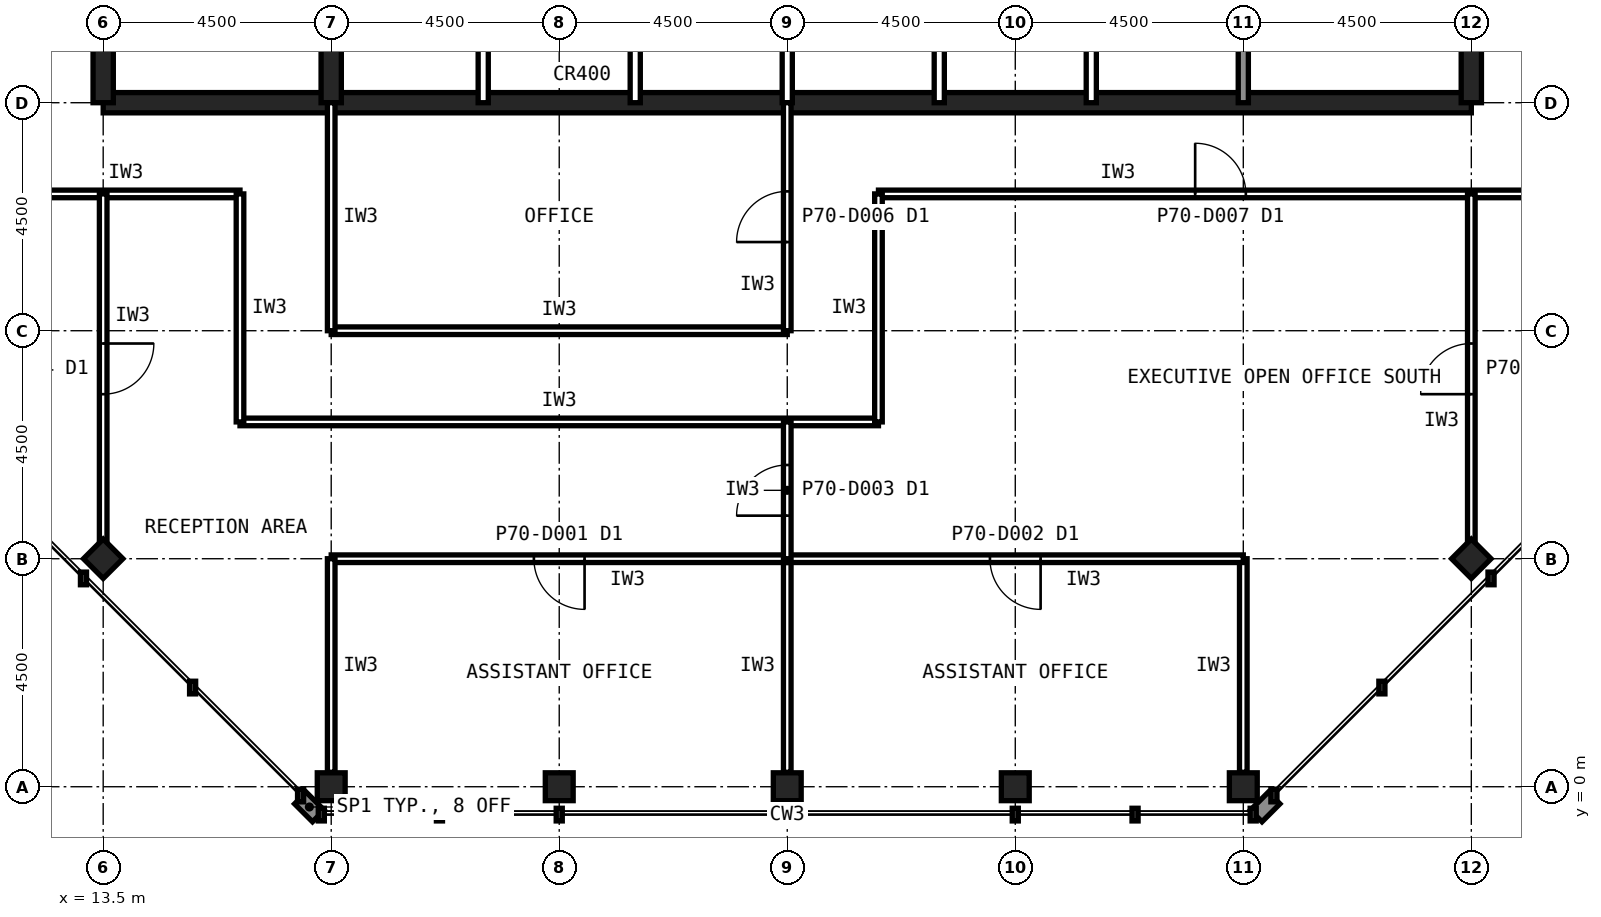
"""IFC4 building model, lengths in metres.
Left out: names, types, materials, properties, quantities, classifications, styles, units other than length and angle.
Written with IfcOpenShell. Run it as: python <this file> out.ifc"""

import sys

from ifc_helpers import new_model, si_unit, direction, frame, frame_2d, origin, origin_2d, place, context, subcontext, project, spatial, rectangle, hollow_rectangle, extrude, element, fill, save


model = new_model("IFC4")
c1 = context("Model", 3, precision=1e-05, world=origin(), true_north=direction((0.0, 1.0)))
c2 = subcontext(c1, "Body", "Model", "MODEL_VIEW")
j1 = project(units=[si_unit("LENGTHUNIT", "METRE"), si_unit("PLANEANGLEUNIT", "RADIAN")], contexts=[c1])
p1 = place(None, origin())
s1 = spatial("IfcSite", under=j1, at=p1, CompositionType="ELEMENT")
p2 = place(p1, origin())
s2 = spatial("IfcBuilding", under=s1, at=p2, CompositionType="ELEMENT")
p3 = place(p2, frame((0.0, 0.0, 294.6)))
s3 = spatial("IfcBuildingStorey", under=s2, at=p3, CompositionType="ELEMENT", Elevation=294.6)
for number, where, z_axis, x_axis in (
    (1, (18.0, 0.0, 0.0), (0.0, 0.0, 1.0), (1.0, 0.0, 0.0)),
    (2, (22.5, 0.0, 0.0), (0.0, 0.0, 1.0), (1.0, 0.0, 0.0)),
    (3, (27.0, 0.0, 0.0), (0.0, 0.0, 1.0), (1.0, 0.0, 0.0)),
    (4, (31.5, 0.0, 0.0), (0.0, 0.0, 1.0), (1.0, 0.0, 0.0)),
    (5, (36.0, 0.0, 0.0), (0.0, 0.0, 1.0), (1.0, 0.0, 0.0)),
    (6, (13.5, 4.5, 0.0), (0.0, 0.0, 1.0), (0.707, 0.707, 0.0)),
    (7, (40.5, 4.5, 0.0), (0.0, 0.0, 1.0), (0.707, 0.707, 0.0)),
):
    element("IfcColumn", number, at=place(p3, frame(where, z_axis=z_axis, x_axis=x_axis)), inside=s3, PredefinedType="COLUMN", context=c2, shape_type="SweptSolid", body=[
        extrude(hollow_rectangle(XDim=0.55, YDim=0.55, WallThickness=0.025, at=origin_2d()), origin(), (0.0, 0.0, 1.0), 4.0),
    ])
p4 = place(p3, frame((13.5, 13.5, 0.0), z_axis=(0.0, 0.0, 1.0), x_axis=(1.0, 0.0, 0.0)))
e8 = element("IfcWall", 8, at=p4, inside=s3, PredefinedType="SHEAR", context=c2, shape_type="SweptSolid", body=[
    extrude(rectangle(XDim=27.0, YDim=0.4, at=frame_2d((13.5, 0.0))), origin(), (0.0, 0.0, 1.0), 4.0),
])
p5 = place(p3, frame((40.5, 13.5, 0.0), z_axis=(0.0, 0.0, 1.0), x_axis=(0.0, 1.0, 0.0)))
e9 = element("IfcWall", 9, at=p5, inside=s3, PredefinedType="SHEAR", context=c2, shape_type="SweptSolid", body=[
    extrude(rectangle(XDim=27.0, YDim=0.4, at=frame_2d((13.5, 0.0))), origin(), (0.0, 0.0, 1.0), 4.0),
])
p6 = place(p5, frame((5.85, 0.0, 0.0)))
e10 = element("IfcOpeningElement", 10, at=p6, cuts=e9, PredefinedType="OPENING", context=c2, shape_type="SweptSolid", body=[
    extrude(rectangle(XDim=1.8, YDim=2.1, at=frame_2d((0.9, 1.05))), frame((0.0, 0.21, 0.0), z_axis=(0.0, -1.0, 0.0), x_axis=(1.0, 0.0, 0.0)), (0.0, 0.0, 1.0), 0.42),
])
p7 = place(p5, frame((19.65, 0.0, 0.0)))
e11 = element("IfcOpeningElement", 11, at=p7, cuts=e9, PredefinedType="OPENING", context=c2, shape_type="SweptSolid", body=[
    extrude(rectangle(XDim=1.2, YDim=2.1, at=frame_2d((0.6, 1.05))), frame((0.0, 0.21, 0.0), z_axis=(0.0, -1.0, 0.0), x_axis=(1.0, 0.0, 0.0)), (0.0, 0.0, 1.0), 0.42),
])
p8 = place(p3, frame((13.5, 40.5, 0.0), z_axis=(0.0, 0.0, 1.0), x_axis=(0.0, -1.0, 0.0)))
e12 = element("IfcWall", 12, at=p8, inside=s3, PredefinedType="SHEAR", context=c2, shape_type="SweptSolid", body=[
    extrude(rectangle(XDim=27.0, YDim=0.4, at=frame_2d((13.5, 0.0))), origin(), (0.0, 0.0, 1.0), 4.0),
])
p9 = place(p8, frame((19.65, 0.0, 0.0)))
e13 = element("IfcOpeningElement", 13, at=p9, cuts=e12, PredefinedType="OPENING", context=c2, shape_type="SweptSolid", body=[
    extrude(rectangle(XDim=1.2, YDim=2.1, at=frame_2d((0.6, 1.05))), frame((0.0, 0.21, 0.0), z_axis=(0.0, -1.0, 0.0), x_axis=(1.0, 0.0, 0.0)), (0.0, 0.0, 1.0), 0.42),
])
p10 = place(p8, frame((5.85, 0.0, 0.0)))
e14 = element("IfcOpeningElement", 14, at=p10, cuts=e12, PredefinedType="OPENING", context=c2, shape_type="SweptSolid", body=[
    extrude(rectangle(XDim=1.8, YDim=2.1, at=frame_2d((0.9, 1.05))), frame((0.0, 0.21, 0.0), z_axis=(0.0, -1.0, 0.0), x_axis=(1.0, 0.0, 0.0)), (0.0, 0.0, 1.0), 0.42),
])
p11 = place(p3, frame((18.0, 13.5, 0.0), z_axis=(0.0, 0.0, 1.0), x_axis=(0.0, 1.0, 0.0)))
e15 = element("IfcWall", 15, at=p11, inside=s3, PredefinedType="SHEAR", context=c2, shape_type="SweptSolid", body=[
    extrude(rectangle(XDim=18.0, YDim=0.4, at=frame_2d((9.0, 0.0))), origin(), (0.0, 0.0, 1.0), 4.0),
])
p12 = place(p3, frame((36.0, 13.5, 0.0), z_axis=(0.0, 0.0, 1.0), x_axis=(0.0, 1.0, 0.0)))
e16 = element("IfcWall", 16, at=p12, inside=s3, PredefinedType="SOLIDWALL", context=c2, shape_type="SweptSolid", body=[
    extrude(rectangle(XDim=4.5, YDim=0.2, at=frame_2d((2.25, 0.0))), origin(), (0.0, 0.0, 1.0), 3.84),
])
for number, where, z_axis, x_axis in (
    (17, (21.0, 13.5, 0.0), (0.0, 0.0, 1.0), (0.0, 1.0, 0.0)),
    (18, (24.0, 13.5, 0.0), (0.0, 0.0, 1.0), (0.0, 1.0, 0.0)),
    (19, (27.0, 13.5, 0.0), (0.0, 0.0, 1.0), (0.0, 1.0, 0.0)),
    (20, (30.0, 13.5, 0.0), (0.0, 0.0, 1.0), (0.0, 1.0, 0.0)),
    (21, (33.0, 13.5, 0.0), (0.0, 0.0, 1.0), (0.0, 1.0, 0.0)),
):
    element("IfcWall", number, at=place(p3, frame(where, z_axis=z_axis, x_axis=x_axis)), inside=s3, PredefinedType="PARTITIONING", context=c2, shape_type="SweptSolid", body=[
        extrude(rectangle(XDim=4.5, YDim=0.2, at=frame_2d((2.25, 0.0))), origin(), (0.0, 0.0, 1.0), 3.84),
    ])
p13 = place(p3, frame((28.8, 11.7, 0.0), z_axis=(0.0, 0.0, 1.0), x_axis=(1.0, 0.0, 0.0)))
e22 = element("IfcWall", 22, at=p13, inside=s3, PredefinedType="PARTITIONING", context=c2, shape_type="SweptSolid", body=[
    extrude(rectangle(XDim=13.5, YDim=0.15, at=frame_2d((6.75, 0.0))), origin(), (0.0, 0.0, 1.0), 3.84),
])
p14 = place(p13, frame((6.25, 0.0, 0.0)))
e23 = element("IfcOpeningElement", 23, at=p14, cuts=e22, PredefinedType="OPENING", context=c2, shape_type="SweptSolid", body=[
    extrude(rectangle(XDim=1.0, YDim=2.1, at=frame_2d((0.5, 1.05))), frame((0.0, 0.085, 0.0), z_axis=(0.0, -1.0, 0.0), x_axis=(1.0, 0.0, 0.0)), (0.0, 0.0, 1.0), 0.17),
])
p15 = place(p3, frame((16.2, 7.2, 0.0), z_axis=(0.0, 0.0, 1.0), x_axis=(1.0, 0.0, 0.0)))
e24 = element("IfcWall", 24, at=p15, inside=s3, PredefinedType="PARTITIONING", context=c2, shape_type="SweptSolid", body=[
    extrude(rectangle(XDim=12.6, YDim=0.15, at=frame_2d((6.3, 0.0))), origin(), (0.0, 0.0, 1.0), 3.84),
])
for number, where, z_axis, x_axis in (
    (25, (11.7, 11.7, 0.0), (0.0, 0.0, 1.0), (1.0, 0.0, 0.0)),
    (26, (16.2, 11.7, 0.0), (0.0, 0.0, 1.0), (0.0, -1.0, 0.0)),
    (27, (28.8, 7.2, 0.0), (0.0, 0.0, 1.0), (0.0, 1.0, 0.0)),
):
    element("IfcWall", number, at=place(p3, frame(where, z_axis=z_axis, x_axis=x_axis)), inside=s3, PredefinedType="PARTITIONING", context=c2, shape_type="SweptSolid", body=[
        extrude(rectangle(XDim=4.5, YDim=0.15, at=frame_2d((2.25, 0.0))), origin(), (0.0, 0.0, 1.0), 3.84),
    ])
p16 = place(p3, frame((18.0, 9.0, 0.0), z_axis=(0.0, 0.0, 1.0), x_axis=(1.0, 0.0, 0.0)))
e28 = element("IfcWall", 28, at=p16, inside=s3, PredefinedType="PARTITIONING", context=c2, shape_type="SweptSolid", body=[
    extrude(rectangle(XDim=9.0, YDim=0.15, at=frame_2d((4.5, 0.0))), origin(), (0.0, 0.0, 1.0), 3.84),
])
p17 = place(p3, frame((27.0, 9.0, 0.0), z_axis=(0.0, 0.0, 1.0), x_axis=(0.0, 1.0, 0.0)))
e29 = element("IfcWall", 29, at=p17, inside=s3, PredefinedType="PARTITIONING", context=c2, shape_type="SweptSolid", body=[
    extrude(rectangle(XDim=4.5, YDim=0.15, at=frame_2d((2.25, 0.0))), origin(), (0.0, 0.0, 1.0), 2.989),
])
p18 = place(p17, frame((1.75, 0.0, 0.0)))
e30 = element("IfcOpeningElement", 30, at=p18, cuts=e29, PredefinedType="OPENING", context=c2, shape_type="SweptSolid", body=[
    extrude(rectangle(XDim=1.0, YDim=2.1, at=frame_2d((0.5, 1.05))), frame((0.0, 0.085, 0.0), z_axis=(0.0, -1.0, 0.0), x_axis=(1.0, 0.0, 0.0)), (0.0, 0.0, 1.0), 0.17),
])
p19 = place(p3, frame((18.0, 13.5, 0.0), z_axis=(0.0, 0.0, 1.0), x_axis=(0.0, -1.0, 0.0)))
e31 = element("IfcWall", 31, at=p19, inside=s3, PredefinedType="PARTITIONING", context=c2, shape_type="SweptSolid", body=[
    extrude(rectangle(XDim=4.5, YDim=0.15, at=frame_2d((2.25, 0.0))), origin(), (0.0, 0.0, 1.0), 2.989),
])
p20 = place(p3, frame((27.0, 0.285, 0.0), z_axis=(0.0, 0.0, 1.0), x_axis=(0.0, 1.0, 0.0)))
e32 = element("IfcWall", 32, at=p20, inside=s3, PredefinedType="PARTITIONING", context=c2, shape_type="SweptSolid", body=[
    extrude(rectangle(XDim=4.215, YDim=0.15, at=frame_2d((2.107, 0.0))), origin(), (0.0, 0.0, 1.0), 2.989),
])
p21 = place(p3, frame((27.0, 4.5, 0.0), z_axis=(0.0, 0.0, 1.0), x_axis=(-1.0, 0.0, 0.0)))
e33 = element("IfcWall", 33, at=p21, inside=s3, PredefinedType="PARTITIONING", context=c2, shape_type="SweptSolid", body=[
    extrude(rectangle(XDim=9.0, YDim=0.15, at=frame_2d((4.5, 0.0))), origin(), (0.0, 0.0, 1.0), 3.84),
])
p22 = place(p21, frame((4.0, 0.0, 0.0)))
e34 = element("IfcOpeningElement", 34, at=p22, cuts=e33, PredefinedType="OPENING", context=c2, shape_type="SweptSolid", body=[
    extrude(rectangle(XDim=1.0, YDim=2.1, at=frame_2d((0.5, 1.05))), frame((0.0, 0.085, 0.0), z_axis=(0.0, -1.0, 0.0), x_axis=(1.0, 0.0, 0.0)), (0.0, 0.0, 1.0), 0.17),
])
for number, where, z_axis, x_axis in (
    (35, (18.0, 4.5, 0.0), (0.0, 0.0, 1.0), (0.0, -1.0, 0.0)),
    (36, (36.0, 0.285, 0.0), (0.0, 0.0, 1.0), (0.0, 1.0, 0.0)),
):
    element("IfcWall", number, at=place(p3, frame(where, z_axis=z_axis, x_axis=x_axis)), inside=s3, PredefinedType="PARTITIONING", context=c2, shape_type="SweptSolid", body=[
        extrude(rectangle(XDim=4.215, YDim=0.15, at=frame_2d((2.107, 0.0))), origin(), (0.0, 0.0, 1.0), 2.989),
    ])
p23 = place(p3, frame((36.0, 4.5, 0.0), z_axis=(0.0, 0.0, 1.0), x_axis=(-1.0, 0.0, 0.0)))
e37 = element("IfcWall", 37, at=p23, inside=s3, PredefinedType="PARTITIONING", context=c2, shape_type="SweptSolid", body=[
    extrude(rectangle(XDim=9.0, YDim=0.15, at=frame_2d((4.5, 0.0))), origin(), (0.0, 0.0, 1.0), 3.84),
])
p24 = place(p23, frame((4.0, 0.0, 0.0)))
e38 = element("IfcOpeningElement", 38, at=p24, cuts=e37, PredefinedType="OPENING", context=c2, shape_type="SweptSolid", body=[
    extrude(rectangle(XDim=1.0, YDim=2.1, at=frame_2d((0.5, 1.05))), frame((0.0, 0.085, 0.0), z_axis=(0.0, -1.0, 0.0), x_axis=(1.0, 0.0, 0.0)), (0.0, 0.0, 1.0), 0.17),
])
p25 = place(p3, frame((40.5, 4.795, 0.0), z_axis=(0.0, 0.0, 1.0), x_axis=(0.0, 1.0, 0.0)))
e39 = element("IfcWall", 39, at=p25, inside=s3, PredefinedType="PARTITIONING", context=c2, shape_type="SweptSolid", body=[
    extrude(rectangle(XDim=6.905, YDim=0.15, at=frame_2d((3.453, 0.0))), origin(), (0.0, 0.0, 1.0), 2.989),
])
p26 = place(p25, frame((2.952, 0.0, 0.0)))
e40 = element("IfcOpeningElement", 40, at=p26, cuts=e39, PredefinedType="OPENING", context=c2, shape_type="SweptSolid", body=[
    extrude(rectangle(XDim=1.0, YDim=2.1, at=frame_2d((0.5, 1.05))), frame((0.0, 0.085, 0.0), z_axis=(0.0, -1.0, 0.0), x_axis=(1.0, 0.0, 0.0)), (0.0, 0.0, 1.0), 0.17),
])
p27 = place(p3, frame((27.0, 4.5, 0.0), z_axis=(0.0, 0.0, 1.0), x_axis=(0.0, 1.0, 0.0)))
e41 = element("IfcWall", 41, at=p27, inside=s3, PredefinedType="PARTITIONING", context=c2, shape_type="SweptSolid", body=[
    extrude(rectangle(XDim=2.7, YDim=0.15, at=frame_2d((1.35, 0.0))), origin(), (0.0, 0.0, 1.0), 2.989),
])
p28 = place(p27, frame((0.85, 0.0, 0.0)))
e42 = element("IfcOpeningElement", 42, at=p28, cuts=e41, PredefinedType="OPENING", context=c2, shape_type="SweptSolid", body=[
    extrude(rectangle(XDim=1.0, YDim=2.1, at=frame_2d((0.5, 1.05))), frame((0.0, 0.085, 0.0), z_axis=(0.0, -1.0, 0.0), x_axis=(1.0, 0.0, 0.0)), (0.0, 0.0, 1.0), 0.17),
])
p29 = place(p3, frame((13.5, 11.7, 0.0), z_axis=(0.0, 0.0, 1.0), x_axis=(0.0, -1.0, 0.0)))
e43 = element("IfcWall", 43, at=p29, inside=s3, PredefinedType="PARTITIONING", context=c2, shape_type="SweptSolid", body=[
    extrude(rectangle(XDim=6.905, YDim=0.15, at=frame_2d((3.453, 0.0))), origin(), (0.0, 0.0, 1.0), 2.989),
])
p30 = place(p29, frame((2.952, 0.0, 0.0)))
e44 = element("IfcOpeningElement", 44, at=p30, cuts=e43, PredefinedType="OPENING", context=c2, shape_type="SweptSolid", body=[
    extrude(rectangle(XDim=1.0, YDim=2.1, at=frame_2d((0.5, 1.05))), frame((0.0, 0.085, 0.0), z_axis=(0.0, -1.0, 0.0), x_axis=(1.0, 0.0, 0.0)), (0.0, 0.0, 1.0), 0.17),
])
p31 = place(p14, origin())
e45 = element("IfcDoor", 45, at=p31, inside=s3, OperationType="SINGLE_SWING_LEFT", PredefinedType="DOOR", context=c2, shape_type="SweptSolid", body=[
    extrude(rectangle(XDim=1.0, YDim=2.1, at=frame_2d((0.5, 1.05))), frame((0.0, 0.025, 0.0), z_axis=(0.0, -1.0, 0.0), x_axis=(1.0, 0.0, 0.0)), (0.0, 0.0, 1.0), 0.05),
])
fill(e23, e45)
p32 = place(p18, origin())
e46 = element("IfcDoor", 46, at=p32, inside=s3, OperationType="SINGLE_SWING_LEFT", PredefinedType="DOOR", context=c2, shape_type="SweptSolid", body=[
    extrude(rectangle(XDim=1.0, YDim=2.1, at=frame_2d((0.5, 1.05))), frame((0.0, 0.025, 0.0), z_axis=(0.0, -1.0, 0.0), x_axis=(1.0, 0.0, 0.0)), (0.0, 0.0, 1.0), 0.05),
])
fill(e30, e46)
p33 = place(p22, origin())
e47 = element("IfcDoor", 47, at=p33, inside=s3, OperationType="SINGLE_SWING_LEFT", PredefinedType="DOOR", context=c2, shape_type="SweptSolid", body=[
    extrude(rectangle(XDim=1.0, YDim=2.1, at=frame_2d((0.5, 1.05))), frame((0.0, 0.025, 0.0), z_axis=(0.0, -1.0, 0.0), x_axis=(1.0, 0.0, 0.0)), (0.0, 0.0, 1.0), 0.05),
])
fill(e34, e47)
p34 = place(p24, origin())
e48 = element("IfcDoor", 48, at=p34, inside=s3, OperationType="SINGLE_SWING_LEFT", PredefinedType="DOOR", context=c2, shape_type="SweptSolid", body=[
    extrude(rectangle(XDim=1.0, YDim=2.1, at=frame_2d((0.5, 1.05))), frame((0.0, 0.025, 0.0), z_axis=(0.0, -1.0, 0.0), x_axis=(1.0, 0.0, 0.0)), (0.0, 0.0, 1.0), 0.05),
])
fill(e38, e48)
p35 = place(p26, origin())
e49 = element("IfcDoor", 49, at=p35, inside=s3, OperationType="SINGLE_SWING_LEFT", PredefinedType="DOOR", context=c2, shape_type="SweptSolid", body=[
    extrude(rectangle(XDim=1.0, YDim=2.1, at=frame_2d((0.5, 1.05))), frame((0.0, 0.025, 0.0), z_axis=(0.0, -1.0, 0.0), x_axis=(1.0, 0.0, 0.0)), (0.0, 0.0, 1.0), 0.05),
])
fill(e40, e49)
p36 = place(p28, origin())
e50 = element("IfcDoor", 50, at=p36, inside=s3, OperationType="SINGLE_SWING_LEFT", PredefinedType="DOOR", context=c2, shape_type="SweptSolid", body=[
    extrude(rectangle(XDim=1.0, YDim=2.1, at=frame_2d((0.5, 1.05))), frame((0.0, 0.025, 0.0), z_axis=(0.0, -1.0, 0.0), x_axis=(1.0, 0.0, 0.0)), (0.0, 0.0, 1.0), 0.05),
])
fill(e42, e50)
p37 = place(p30, origin())
e51 = element("IfcDoor", 51, at=p37, inside=s3, OperationType="SINGLE_SWING_LEFT", PredefinedType="DOOR", context=c2, shape_type="SweptSolid", body=[
    extrude(rectangle(XDim=1.0, YDim=2.1, at=frame_2d((0.5, 1.05))), frame((0.0, 0.025, 0.0), z_axis=(0.0, -1.0, 0.0), x_axis=(1.0, 0.0, 0.0)), (0.0, 0.0, 1.0), 0.05),
])
fill(e44, e51)
save(model, sys.argv[1])
